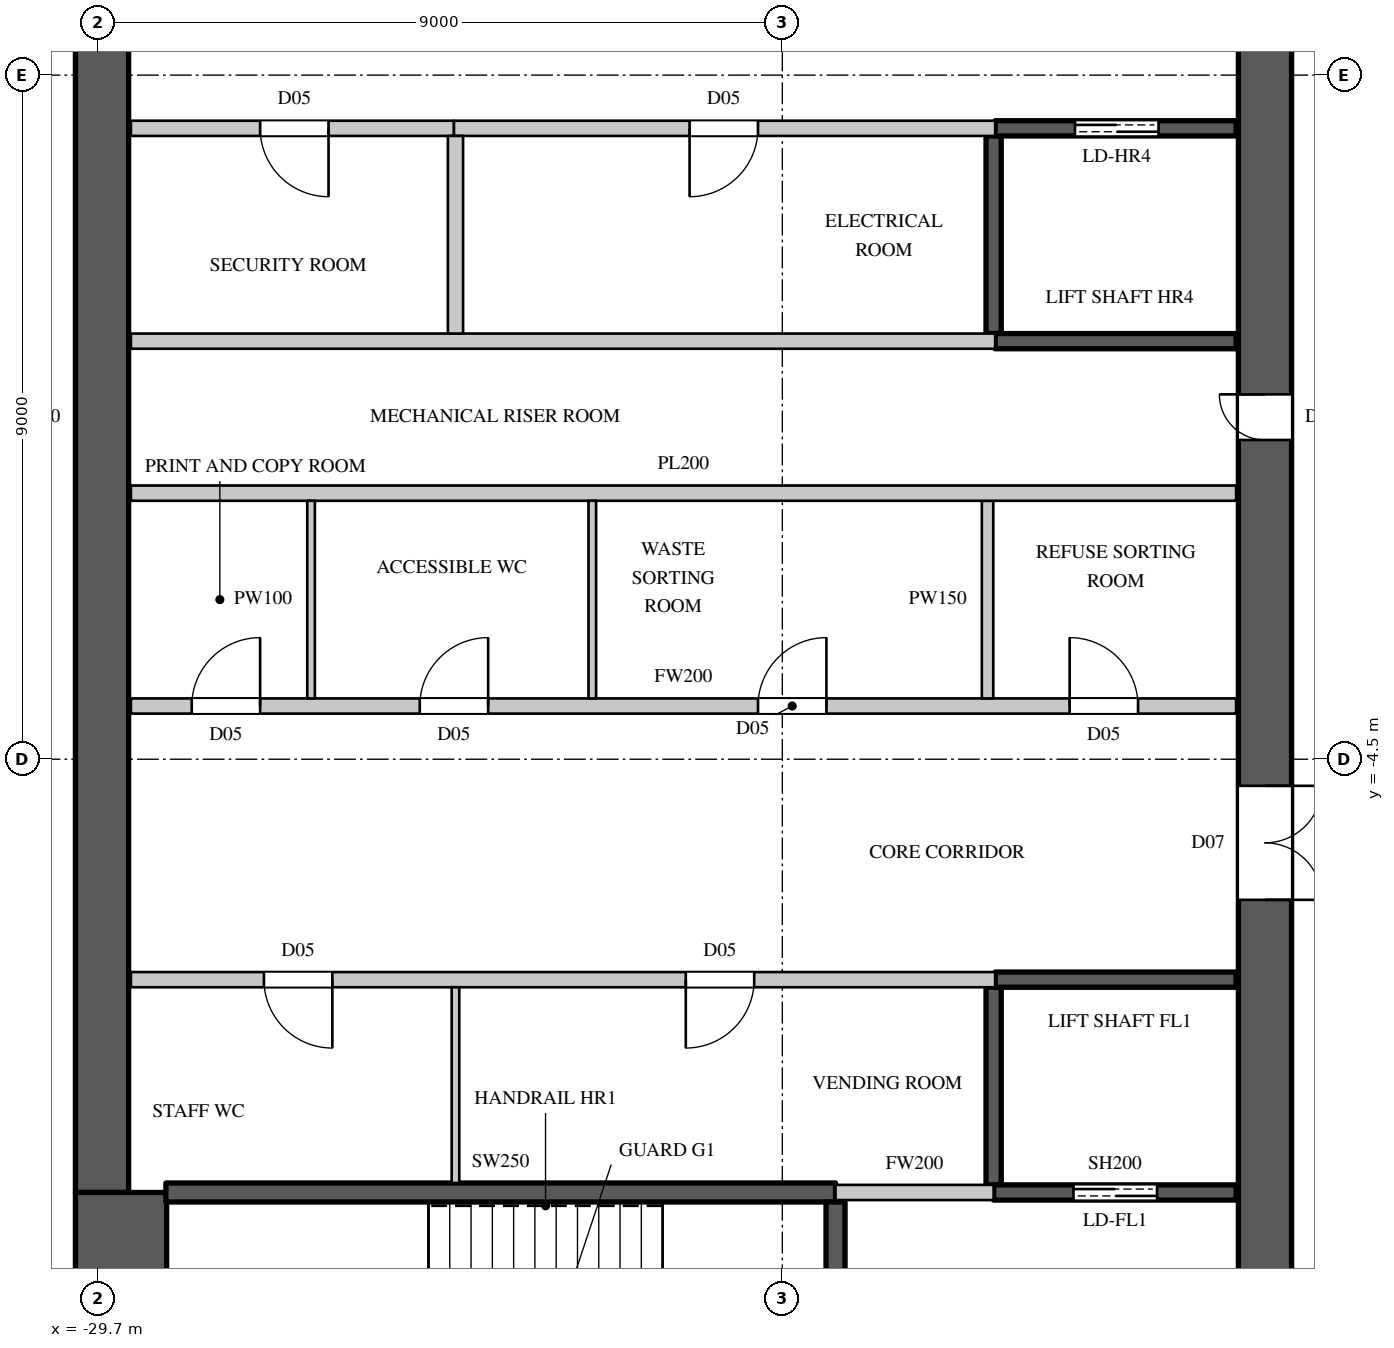
"""IFC4 building model, lengths in metres.
Left out: names, types, materials, properties, quantities, classifications, styles, units other than length and angle.
Written with IfcOpenShell. Run it as: python <this file> out.ifc"""

import sys

from ifc_helpers import new_model, si_unit, direction, frame, frame_2d, origin, place, context, subcontext, project, spatial, rectangle, extrude, element, fill, save


model = new_model("IFC4")
c1 = context("Model", 3, precision=1e-05, world=origin(), true_north=direction((0.0, 1.0)))
c2 = subcontext(c1, "Body", "Model", "MODEL_VIEW")
j1 = project(units=[si_unit("LENGTHUNIT", "METRE"), si_unit("PLANEANGLEUNIT", "RADIAN")], contexts=[c1])
p1 = place(None, origin())
s1 = spatial("IfcSite", under=j1, at=p1, CompositionType="ELEMENT")
p2 = place(p1, origin())
s2 = spatial("IfcBuilding", under=s1, at=p2, CompositionType="ELEMENT")
p3 = place(p2, frame((0.0, 0.0, 268.0)))
s3 = spatial("IfcBuildingStorey", under=s2, at=p3, CompositionType="ELEMENT", Elevation=268.0)
p4 = place(p3, frame((-14.35, -14.8, 0.0), z_axis=(0.0, 0.0, 1.0), x_axis=(0.0, 1.0, 0.0)))
e1 = element("IfcWall", 1, at=p4, inside=s3, PredefinedType="SHEAR", context=c2, shape_type="SweptSolid", body=[
    extrude(rectangle(XDim=29.6, YDim=0.7, at=frame_2d((14.8, 0.0))), origin(), (0.0, 0.0, 1.0), 4.1),
])
p5 = place(p4, frame((1.55, 0.0, 0.0)))
e2 = element("IfcOpeningElement", 2, at=p5, cuts=e1, PredefinedType="OPENING", context=c2, shape_type="SweptSolid", body=[
    extrude(rectangle(XDim=1.5, YDim=2.4, at=frame_2d((0.75, 1.2))), frame((0.0, 0.36, 0.0), z_axis=(0.0, -1.0, 0.0), x_axis=(1.0, 0.0, 0.0)), (0.0, 0.0, 1.0), 0.72),
])
p6 = place(p4, frame((26.55, 0.0, 0.0)))
e3 = element("IfcOpeningElement", 3, at=p6, cuts=e1, PredefinedType="OPENING", context=c2, shape_type="SweptSolid", body=[
    extrude(rectangle(XDim=1.5, YDim=2.4, at=frame_2d((0.75, 1.2))), frame((0.0, 0.36, 0.0), z_axis=(0.0, -1.0, 0.0), x_axis=(1.0, 0.0, 0.0)), (0.0, 0.0, 1.0), 0.72),
])
p7 = place(p4, frame((8.45, 0.0, 0.0)))
e4 = element("IfcOpeningElement", 4, at=p7, cuts=e1, PredefinedType="OPENING", context=c2, shape_type="SweptSolid", body=[
    extrude(rectangle(XDim=1.5, YDim=2.4, at=frame_2d((0.75, 1.2))), frame((0.0, 0.36, 0.0), z_axis=(0.0, -1.0, 0.0), x_axis=(1.0, 0.0, 0.0)), (0.0, 0.0, 1.0), 0.72),
])
p8 = place(p4, frame((19.65, 0.0, 0.0)))
e5 = element("IfcOpeningElement", 5, at=p8, cuts=e1, PredefinedType="OPENING", context=c2, shape_type="SweptSolid", body=[
    extrude(rectangle(XDim=1.5, YDim=2.4, at=frame_2d((0.75, 1.2))), frame((0.0, 0.36, 0.0), z_axis=(0.0, -1.0, 0.0), x_axis=(1.0, 0.0, 0.0)), (0.0, 0.0, 1.0), 0.72),
])
p9 = place(p4, frame((14.5, 0.0, 0.0)))
e6 = element("IfcOpeningElement", 6, at=p9, cuts=e1, PredefinedType="OPENING", context=c2, shape_type="SweptSolid", body=[
    extrude(rectangle(XDim=0.6, YDim=2.0, at=frame_2d((0.3, 1.0))), frame((0.0, 0.36, 0.0), z_axis=(0.0, -1.0, 0.0), x_axis=(1.0, 0.0, 0.0)), (0.0, 0.0, 1.0), 0.72),
])
p10 = place(p3, frame((-29.65, -10.2, 0.0), z_axis=(0.0, 0.0, 1.0), x_axis=(0.0, 1.0, 0.0)))
e7 = element("IfcWall", 7, at=p10, inside=s3, PredefinedType="SHEAR", context=c2, shape_type="SweptSolid", body=[
    extrude(rectangle(XDim=20.4, YDim=0.7, at=frame_2d((10.2, 0.0))), origin(), (0.0, 0.0, 1.0), 4.1),
])
p11 = place(p3, frame((-29.4, -14.8, 0.0), z_axis=(0.0, 0.0, 1.0), x_axis=(0.0, 1.0, 0.0)))
e8 = element("IfcWall", 8, at=p11, inside=s3, PredefinedType="SHEAR", context=c2, shape_type="SweptSolid", body=[
    extrude(rectangle(XDim=4.6, YDim=1.2, at=frame_2d((2.3, 0.0))), origin(), (0.0, 0.0, 1.0), 4.1),
])
p12 = place(p3, frame((-29.27, -7.4, 0.0), z_axis=(0.0, 0.0, 1.0), x_axis=(1.0, 0.0, 0.0)))
e9 = element("IfcWall", 9, at=p12, inside=s3, PredefinedType="PARTITIONING", context=c2, shape_type="SweptSolid", body=[
    extrude(rectangle(XDim=11.37, YDim=0.2, at=frame_2d((5.685, 0.0))), origin(), (0.0, 0.0, 1.0), 3.8),
])
p13 = place(p12, frame((1.75, 0.0, 0.0)))
e10 = element("IfcOpeningElement", 10, at=p13, cuts=e9, PredefinedType="OPENING", context=c2, shape_type="SweptSolid", body=[
    extrude(rectangle(XDim=0.9, YDim=2.2, at=frame_2d((0.45, 1.1))), frame((0.0, 0.11, 0.0), z_axis=(0.0, -1.0, 0.0), x_axis=(1.0, 0.0, 0.0)), (0.0, 0.0, 1.0), 0.22),
])
p14 = place(p12, frame((7.3, 0.0, 0.0)))
e11 = element("IfcOpeningElement", 11, at=p14, cuts=e9, PredefinedType="OPENING", context=c2, shape_type="SweptSolid", body=[
    extrude(rectangle(XDim=0.9, YDim=2.2, at=frame_2d((0.45, 1.1))), frame((0.0, 0.11, 0.0), z_axis=(0.0, -1.0, 0.0), x_axis=(1.0, 0.0, 0.0)), (0.0, 0.0, 1.0), 0.22),
])
p15 = place(p3, frame((-29.27, -3.8, 0.0), z_axis=(0.0, 0.0, 1.0), x_axis=(1.0, 0.0, 0.0)))
e12 = element("IfcWall", 12, at=p15, inside=s3, PredefinedType="PARTITIONING", context=c2, shape_type="SweptSolid", body=[
    extrude(rectangle(XDim=14.54, YDim=0.2, at=frame_2d((7.27, 0.0))), origin(), (0.0, 0.0, 1.0), 3.8),
])
p16 = place(p15, frame((0.8, 0.0, 0.0)))
e13 = element("IfcOpeningElement", 13, at=p16, cuts=e12, PredefinedType="OPENING", context=c2, shape_type="SweptSolid", body=[
    extrude(rectangle(XDim=0.9, YDim=2.2, at=frame_2d((0.45, 1.1))), frame((0.0, 0.11, 0.0), z_axis=(0.0, -1.0, 0.0), x_axis=(1.0, 0.0, 0.0)), (0.0, 0.0, 1.0), 0.22),
])
p17 = place(p15, frame((3.8, 0.0, 0.0)))
e14 = element("IfcOpeningElement", 14, at=p17, cuts=e12, PredefinedType="OPENING", context=c2, shape_type="SweptSolid", body=[
    extrude(rectangle(XDim=0.9, YDim=2.2, at=frame_2d((0.45, 1.1))), frame((0.0, 0.11, 0.0), z_axis=(0.0, -1.0, 0.0), x_axis=(1.0, 0.0, 0.0)), (0.0, 0.0, 1.0), 0.22),
])
p18 = place(p15, frame((8.25, 0.0, 0.0)))
e15 = element("IfcOpeningElement", 15, at=p18, cuts=e12, PredefinedType="OPENING", context=c2, shape_type="SweptSolid", body=[
    extrude(rectangle(XDim=0.9, YDim=2.2, at=frame_2d((0.45, 1.1))), frame((0.0, 0.11, 0.0), z_axis=(0.0, -1.0, 0.0), x_axis=(1.0, 0.0, 0.0)), (0.0, 0.0, 1.0), 0.22),
])
p19 = place(p15, frame((12.35, 0.0, 0.0)))
e16 = element("IfcOpeningElement", 16, at=p19, cuts=e12, PredefinedType="OPENING", context=c2, shape_type="SweptSolid", body=[
    extrude(rectangle(XDim=0.9, YDim=2.2, at=frame_2d((0.45, 1.1))), frame((0.0, 0.11, 0.0), z_axis=(0.0, -1.0, 0.0), x_axis=(1.0, 0.0, 0.0)), (0.0, 0.0, 1.0), 0.22),
])
p20 = place(p3, frame((-29.27, 3.8, 0.0), z_axis=(0.0, 0.0, 1.0), x_axis=(1.0, 0.0, 0.0)))
e17 = element("IfcWall", 17, at=p20, inside=s3, PredefinedType="PARTITIONING", context=c2, shape_type="SweptSolid", body=[
    extrude(rectangle(XDim=4.25, YDim=0.2, at=frame_2d((2.125, 0.0))), origin(), (0.0, 0.0, 1.0), 3.8),
])
p21 = place(p20, frame((1.7, 0.0, 0.0)))
e18 = element("IfcOpeningElement", 18, at=p21, cuts=e17, PredefinedType="OPENING", context=c2, shape_type="SweptSolid", body=[
    extrude(rectangle(XDim=0.9, YDim=2.2, at=frame_2d((0.45, 1.1))), frame((0.0, 0.11, 0.0), z_axis=(0.0, -1.0, 0.0), x_axis=(1.0, 0.0, 0.0)), (0.0, 0.0, 1.0), 0.22),
])
p22 = place(p3, frame((-20.0, -10.2, 0.0), z_axis=(0.0, 0.0, 1.0), x_axis=(1.0, 0.0, 0.0)))
e19 = element("IfcWall", 19, at=p22, inside=s3, PredefinedType="PARTITIONING", context=c2, shape_type="SweptSolid", body=[
    extrude(rectangle(XDim=2.08, YDim=0.2, at=frame_2d((1.04, 0.0))), origin(), (0.0, 0.0, 1.0), 3.8),
])
p23 = place(p3, frame((-18.0, -3.7, 0.0), z_axis=(0.0, 0.0, 1.0), x_axis=(0.0, 1.0, 0.0)))
e20 = element("IfcWall", 20, at=p23, inside=s3, PredefinedType="PARTITIONING", context=c2, shape_type="SweptSolid", body=[
    extrude(rectangle(XDim=2.6, YDim=0.15, at=frame_2d((1.3, 0.0))), origin(), (0.0, 0.0, 1.0), 3.8),
])
p24 = place(p3, frame((-29.27, -1.0, 0.0), z_axis=(0.0, 0.0, 1.0), x_axis=(1.0, 0.0, 0.0)))
e21 = element("IfcWall", 21, at=p24, inside=s3, PredefinedType="PARTITIONING", context=c2, shape_type="SweptSolid", body=[
    extrude(rectangle(XDim=14.54, YDim=0.2, at=frame_2d((7.27, 0.0))), origin(), (0.0, 0.0, 1.0), 3.8),
])
p25 = place(p3, frame((-29.27, 1.0, 0.0), z_axis=(0.0, 0.0, 1.0), x_axis=(1.0, 0.0, 0.0)))
e22 = element("IfcWall", 22, at=p25, inside=s3, PredefinedType="PARTITIONING", context=c2, shape_type="SweptSolid", body=[
    extrude(rectangle(XDim=11.37, YDim=0.2, at=frame_2d((5.685, 0.0))), origin(), (0.0, 0.0, 1.0), 3.8),
])
p26 = place(p3, frame((-25.02, 3.8, 0.0), z_axis=(0.0, 0.0, 1.0), x_axis=(1.0, 0.0, 0.0)))
e23 = element("IfcWall", 23, at=p26, inside=s3, PredefinedType="PARTITIONING", context=c2, shape_type="SweptSolid", body=[
    extrude(rectangle(XDim=7.12, YDim=0.2, at=frame_2d((3.56, 0.0))), origin(), (0.0, 0.0, 1.0), 3.8),
])
p27 = place(p26, frame((3.1, 0.0, 0.0)))
e24 = element("IfcOpeningElement", 24, at=p27, cuts=e23, PredefinedType="OPENING", context=c2, shape_type="SweptSolid", body=[
    extrude(rectangle(XDim=0.9, YDim=2.2, at=frame_2d((0.45, 1.1))), frame((0.0, 0.11, 0.0), z_axis=(0.0, -1.0, 0.0), x_axis=(1.0, 0.0, 0.0)), (0.0, 0.0, 1.0), 0.22),
])
p28 = place(p3, frame((-25.0, 1.1, 0.0), z_axis=(0.0, 0.0, 1.0), x_axis=(0.0, 1.0, 0.0)))
e25 = element("IfcWall", 25, at=p28, inside=s3, PredefinedType="PARTITIONING", context=c2, shape_type="SweptSolid", body=[
    extrude(rectangle(XDim=2.6, YDim=0.2, at=frame_2d((1.3, 0.0))), origin(), (0.0, 0.0, 1.0), 3.8),
])
p29 = place(p3, frame((-17.92, -10.1, 0.0), z_axis=(0.0, 0.0, 1.0), x_axis=(0.0, 1.0, 0.0)))
e26 = element("IfcWall", 26, at=p29, inside=s3, PredefinedType="SHEAR", context=c2, shape_type="SweptSolid", body=[
    extrude(rectangle(XDim=2.6, YDim=0.2, at=frame_2d((1.3, 0.0))), origin(), (0.0, 0.0, 1.0), 3.8),
])
p30 = place(p3, frame((-17.92, -10.2, 0.0), z_axis=(0.0, 0.0, 1.0), x_axis=(1.0, 0.0, 0.0)))
e27 = element("IfcWall", 27, at=p30, inside=s3, PredefinedType="SHEAR", context=c2, shape_type="SweptSolid", body=[
    extrude(rectangle(XDim=3.19, YDim=0.2, at=frame_2d((1.595, 0.0))), origin(), (0.0, 0.0, 1.0), 3.8),
])
p31 = place(p30, frame((1.05, 0.0, 0.0)))
e28 = element("IfcOpeningElement", 28, at=p31, cuts=e27, PredefinedType="OPENING", context=c2, shape_type="SweptSolid", body=[
    extrude(rectangle(XDim=1.1, YDim=2.2, at=frame_2d((0.55, 1.1))), frame((0.0, 0.11, 0.0), z_axis=(0.0, -1.0, 0.0), x_axis=(1.0, 0.0, 0.0)), (0.0, 0.0, 1.0), 0.22),
])
p32 = place(p3, frame((-17.9, -7.4, 0.0), z_axis=(0.0, 0.0, 1.0), x_axis=(1.0, 0.0, 0.0)))
e29 = element("IfcWall", 29, at=p32, inside=s3, PredefinedType="SHEAR", context=c2, shape_type="SweptSolid", body=[
    extrude(rectangle(XDim=3.17, YDim=0.2, at=frame_2d((1.585, 0.0))), origin(), (0.0, 0.0, 1.0), 3.8),
])
p33 = place(p3, frame((-17.92, 1.1, 0.0), z_axis=(0.0, 0.0, 1.0), x_axis=(0.0, 1.0, 0.0)))
e30 = element("IfcWall", 30, at=p33, inside=s3, PredefinedType="SHEAR", context=c2, shape_type="SweptSolid", body=[
    extrude(rectangle(XDim=2.6, YDim=0.2, at=frame_2d((1.3, 0.0))), origin(), (0.0, 0.0, 1.0), 3.8),
])
p34 = place(p3, frame((-17.9, 1.0, 0.0), z_axis=(0.0, 0.0, 1.0), x_axis=(1.0, 0.0, 0.0)))
e31 = element("IfcWall", 31, at=p34, inside=s3, PredefinedType="SHEAR", context=c2, shape_type="SweptSolid", body=[
    extrude(rectangle(XDim=3.17, YDim=0.2, at=frame_2d((1.585, 0.0))), origin(), (0.0, 0.0, 1.0), 3.8),
])
p35 = place(p3, frame((-17.9, 3.8, 0.0), z_axis=(0.0, 0.0, 1.0), x_axis=(1.0, 0.0, 0.0)))
e32 = element("IfcWall", 32, at=p35, inside=s3, PredefinedType="SHEAR", context=c2, shape_type="SweptSolid", body=[
    extrude(rectangle(XDim=3.17, YDim=0.2, at=frame_2d((1.585, 0.0))), origin(), (0.0, 0.0, 1.0), 3.8),
])
p36 = place(p35, frame((1.05, 0.0, 0.0)))
e33 = element("IfcOpeningElement", 33, at=p36, cuts=e32, PredefinedType="OPENING", context=c2, shape_type="SweptSolid", body=[
    extrude(rectangle(XDim=1.1, YDim=2.2, at=frame_2d((0.55, 1.1))), frame((0.0, 0.11, 0.0), z_axis=(0.0, -1.0, 0.0), x_axis=(1.0, 0.0, 0.0)), (0.0, 0.0, 1.0), 0.22),
])
p37 = place(p3, frame((-28.81, -10.2, 0.0), z_axis=(0.0, 0.0, 1.0), x_axis=(1.0, 0.0, 0.0)))
e34 = element("IfcWall", 34, at=p37, inside=s3, PredefinedType="SHEAR", context=c2, shape_type="SweptSolid", body=[
    extrude(rectangle(XDim=8.81, YDim=0.25, at=frame_2d((4.405, 0.0))), origin(), (0.0, 0.0, 1.0), 3.8),
])
p38 = place(p3, frame((-20.0, -14.77, 0.0), z_axis=(0.0, 0.0, 1.0), x_axis=(0.0, 1.0, 0.0)))
e35 = element("IfcWall", 35, at=p38, inside=s3, PredefinedType="SHEAR", context=c2, shape_type="SweptSolid", body=[
    extrude(rectangle(XDim=4.445, YDim=0.25, at=frame_2d((2.223, 0.0))), origin(), (0.0, 0.0, 1.0), 3.8),
])
p39 = place(p38, frame((1.7, 0.0, 0.0)))
e36 = element("IfcOpeningElement", 36, at=p39, cuts=e35, PredefinedType="OPENING", context=c2, shape_type="SweptSolid", body=[
    extrude(rectangle(XDim=1.1, YDim=2.2, at=frame_2d((0.55, 1.1))), frame((0.0, 0.135, 0.0), z_axis=(0.0, -1.0, 0.0), x_axis=(1.0, 0.0, 0.0)), (0.0, 0.0, 1.0), 0.27),
])
p40 = place(p3, frame((-26.9, -3.7, 0.0), z_axis=(0.0, 0.0, 1.0), x_axis=(0.0, 1.0, 0.0)))
e37 = element("IfcWall", 37, at=p40, inside=s3, PredefinedType="PARTITIONING", context=c2, shape_type="SweptSolid", body=[
    extrude(rectangle(XDim=2.6, YDim=0.1, at=frame_2d((1.3, 0.0))), origin(), (0.0, 0.0, 1.0), 3.8),
])
p41 = place(p3, frame((-25.0, -10.075, 0.0), z_axis=(0.0, 0.0, 1.0), x_axis=(0.0, 1.0, 0.0)))
e38 = element("IfcWall", 38, at=p41, inside=s3, PredefinedType="PARTITIONING", context=c2, shape_type="SweptSolid", body=[
    extrude(rectangle(XDim=2.575, YDim=0.1, at=frame_2d((1.288, 0.0))), origin(), (0.0, 0.0, 1.0), 3.8),
])
p42 = place(p3, frame((-23.2, -3.7, 0.0), z_axis=(0.0, 0.0, 1.0), x_axis=(0.0, 1.0, 0.0)))
e39 = element("IfcWall", 39, at=p42, inside=s3, PredefinedType="PARTITIONING", context=c2, shape_type="SweptSolid", body=[
    extrude(rectangle(XDim=2.6, YDim=0.1, at=frame_2d((1.3, 0.0))), origin(), (0.0, 0.0, 1.0), 3.8),
])
p43 = place(p13, origin())
e40 = element("IfcDoor", 40, at=p43, inside=s3, OperationType="SINGLE_SWING_LEFT", PredefinedType="DOOR", context=c2, shape_type="SweptSolid", body=[
    extrude(rectangle(XDim=0.9, YDim=2.2, at=frame_2d((0.45, 1.1))), frame((0.0, 0.025, 0.0), z_axis=(0.0, -1.0, 0.0), x_axis=(1.0, 0.0, 0.0)), (0.0, 0.0, 1.0), 0.05),
])
fill(e10, e40)
p44 = place(p14, origin())
e41 = element("IfcDoor", 41, at=p44, inside=s3, OperationType="SINGLE_SWING_RIGHT", PredefinedType="DOOR", context=c2, shape_type="SweptSolid", body=[
    extrude(rectangle(XDim=0.9, YDim=2.2, at=frame_2d((0.45, 1.1))), frame((0.0, 0.025, 0.0), z_axis=(0.0, -1.0, 0.0), x_axis=(1.0, 0.0, 0.0)), (0.0, 0.0, 1.0), 0.05),
])
fill(e11, e41)
p45 = place(p16, origin())
e42 = element("IfcDoor", 42, at=p45, inside=s3, OperationType="SINGLE_SWING_RIGHT", PredefinedType="DOOR", context=c2, shape_type="SweptSolid", body=[
    extrude(rectangle(XDim=0.9, YDim=2.2, at=frame_2d((0.45, 1.1))), frame((0.0, 0.025, 0.0), z_axis=(0.0, -1.0, 0.0), x_axis=(1.0, 0.0, 0.0)), (0.0, 0.0, 1.0), 0.05),
])
fill(e13, e42)
p46 = place(p17, origin())
e43 = element("IfcDoor", 43, at=p46, inside=s3, OperationType="SINGLE_SWING_RIGHT", PredefinedType="DOOR", context=c2, shape_type="SweptSolid", body=[
    extrude(rectangle(XDim=0.9, YDim=2.2, at=frame_2d((0.45, 1.1))), frame((0.0, 0.025, 0.0), z_axis=(0.0, -1.0, 0.0), x_axis=(1.0, 0.0, 0.0)), (0.0, 0.0, 1.0), 0.05),
])
fill(e14, e43)
p47 = place(p18, origin())
e44 = element("IfcDoor", 44, at=p47, inside=s3, OperationType="SINGLE_SWING_RIGHT", PredefinedType="DOOR", context=c2, shape_type="SweptSolid", body=[
    extrude(rectangle(XDim=0.9, YDim=2.2, at=frame_2d((0.45, 1.1))), frame((0.0, 0.025, 0.0), z_axis=(0.0, -1.0, 0.0), x_axis=(1.0, 0.0, 0.0)), (0.0, 0.0, 1.0), 0.05),
])
fill(e15, e44)
p48 = place(p19, origin())
e45 = element("IfcDoor", 45, at=p48, inside=s3, OperationType="SINGLE_SWING_LEFT", PredefinedType="DOOR", context=c2, shape_type="SweptSolid", body=[
    extrude(rectangle(XDim=0.9, YDim=2.2, at=frame_2d((0.45, 1.1))), frame((0.0, 0.025, 0.0), z_axis=(0.0, -1.0, 0.0), x_axis=(1.0, 0.0, 0.0)), (0.0, 0.0, 1.0), 0.05),
])
fill(e16, e45)
p49 = place(p21, origin())
e46 = element("IfcDoor", 46, at=p49, inside=s3, OperationType="SINGLE_SWING_LEFT", PredefinedType="DOOR", context=c2, shape_type="SweptSolid", body=[
    extrude(rectangle(XDim=0.9, YDim=2.2, at=frame_2d((0.45, 1.1))), frame((0.0, 0.025, 0.0), z_axis=(0.0, -1.0, 0.0), x_axis=(1.0, 0.0, 0.0)), (0.0, 0.0, 1.0), 0.05),
])
fill(e18, e46)
p50 = place(p27, origin())
e47 = element("IfcDoor", 47, at=p50, inside=s3, OperationType="SINGLE_SWING_RIGHT", PredefinedType="DOOR", context=c2, shape_type="SweptSolid", body=[
    extrude(rectangle(XDim=0.9, YDim=2.2, at=frame_2d((0.45, 1.1))), frame((0.0, 0.025, 0.0), z_axis=(0.0, -1.0, 0.0), x_axis=(1.0, 0.0, 0.0)), (0.0, 0.0, 1.0), 0.05),
])
fill(e24, e47)
p51 = place(p31, origin())
e48 = element("IfcDoor", 48, at=p51, inside=s3, OperationType="DOUBLE_DOOR_SLIDING", PredefinedType="DOOR", context=c2, shape_type="SweptSolid", body=[
    extrude(rectangle(XDim=1.1, YDim=2.2, at=frame_2d((0.55, 1.1))), frame((0.0, 0.025, 0.0), z_axis=(0.0, -1.0, 0.0), x_axis=(1.0, 0.0, 0.0)), (0.0, 0.0, 1.0), 0.05),
])
fill(e28, e48)
p52 = place(p36, origin())
e49 = element("IfcDoor", 49, at=p52, inside=s3, OperationType="DOUBLE_DOOR_SLIDING", PredefinedType="DOOR", context=c2, shape_type="SweptSolid", body=[
    extrude(rectangle(XDim=1.1, YDim=2.2, at=frame_2d((0.55, 1.1))), frame((0.0, 0.025, 0.0), z_axis=(0.0, -1.0, 0.0), x_axis=(1.0, 0.0, 0.0)), (0.0, 0.0, 1.0), 0.05),
])
fill(e33, e49)
p53 = place(p7, origin())
e50 = element("IfcDoor", 50, at=p53, inside=s3, OperationType="DOUBLE_DOOR_SINGLE_SWING", PredefinedType="DOOR", context=c2, shape_type="SweptSolid", body=[
    extrude(rectangle(XDim=1.5, YDim=2.4, at=frame_2d((0.75, 1.2))), frame((0.0, -0.295, 0.0), z_axis=(0.0, -1.0, 0.0), x_axis=(1.0, 0.0, 0.0)), (0.0, 0.0, 1.0), 0.05),
])
fill(e4, e50)
p54 = place(p9, origin())
e51 = element("IfcDoor", 51, at=p54, inside=s3, OperationType="SINGLE_SWING_RIGHT", PredefinedType="DOOR", context=c2, shape_type="SweptSolid", body=[
    extrude(rectangle(XDim=0.6, YDim=2.0, at=frame_2d((0.3, 1.0))), frame((0.0, 0.345, 0.0), z_axis=(0.0, -1.0, 0.0), x_axis=(1.0, 0.0, 0.0)), (0.0, 0.0, 1.0), 0.05),
])
fill(e6, e51)
save(model, sys.argv[1])
